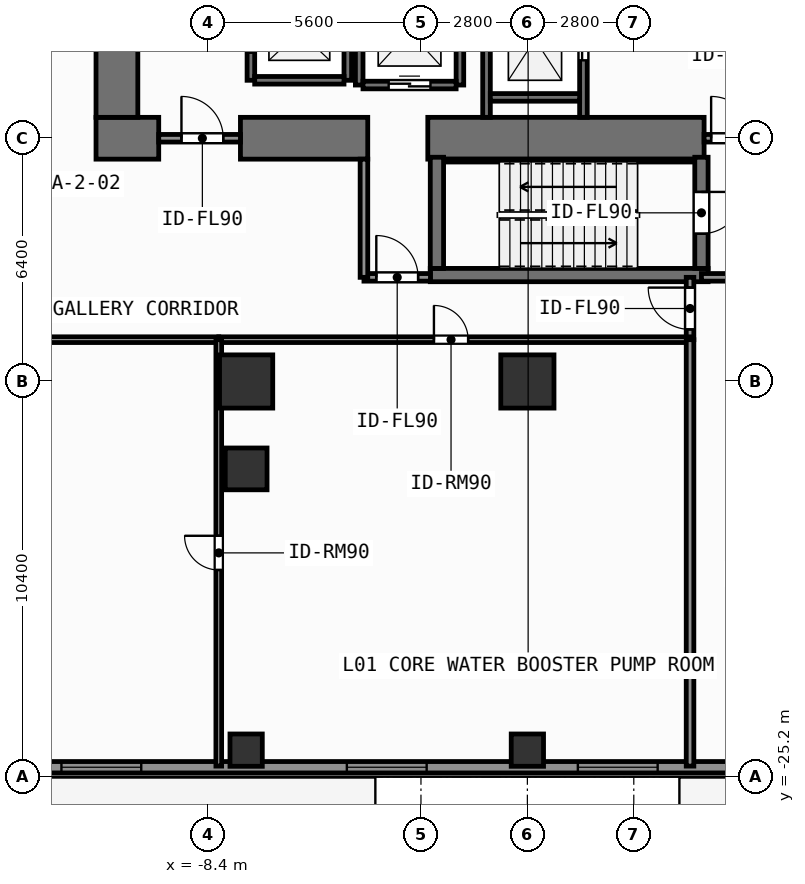
"""IFC4 building model, lengths in metres.
Left out: names, types, materials, properties, quantities, classifications, styles, units other than length and angle.
Written with IfcOpenShell. Run it as: python <this file> out.ifc"""

import sys

from ifc_helpers import new_model, si_unit, direction, frame, frame_2d, origin, origin_2d, place, context, subcontext, project, spatial, rectangle, extrude, element, fill, save


model = new_model("IFC4")
c1 = context("Model", 3, precision=1e-05, world=origin(), true_north=direction((0.0, 1.0)))
c2 = subcontext(c1, "Body", "Model", "MODEL_VIEW")
j1 = project(units=[si_unit("LENGTHUNIT", "METRE"), si_unit("PLANEANGLEUNIT", "RADIAN")], contexts=[c1])
p1 = place(None, origin())
s1 = spatial("IfcSite", under=j1, at=p1, CompositionType="ELEMENT")
p2 = place(p1, origin())
s2 = spatial("IfcBuilding", under=s1, at=p2, CompositionType="ELEMENT")
p3 = place(p2, origin())
s3 = spatial("IfcBuildingStorey", under=s2, at=p3, CompositionType="ELEMENT", Elevation=0.0)
p4 = place(p3, frame((-11.35, -8.4, 0.0), z_axis=(0.0, 0.0, 1.0), x_axis=(1.0, 0.0, 0.0)))
e1 = element("IfcWall", 1, at=p4, inside=s3, PredefinedType="SHEAR", context=c2, shape_type="SweptSolid", body=[
    extrude(rectangle(XDim=1.65, YDim=1.1, at=frame_2d((0.825, 0.0))), origin(), (0.0, 0.0, 1.0), 4.8),
])
p5 = place(p3, frame((-7.55, -8.4, 0.0), z_axis=(0.0, 0.0, 1.0), x_axis=(1.0, 0.0, 0.0)))
e2 = element("IfcWall", 2, at=p5, inside=s3, PredefinedType="SHEAR", context=c2, shape_type="SweptSolid", body=[
    extrude(rectangle(XDim=3.35, YDim=1.1, at=frame_2d((1.675, 0.0))), origin(), (0.0, 0.0, 1.0), 4.8),
])
p6 = place(p3, frame((-2.62, -8.4, 0.0), z_axis=(0.0, 0.0, 1.0), x_axis=(1.0, 0.0, 0.0)))
e3 = element("IfcWall", 3, at=p6, inside=s3, PredefinedType="SHEAR", context=c2, shape_type="SweptSolid", body=[
    extrude(rectangle(XDim=7.27, YDim=1.1, at=frame_2d((3.635, 0.0))), origin(), (0.0, 0.0, 1.0), 4.8),
])
p7 = place(p3, frame((-10.8, -7.85, 0.0), z_axis=(0.0, 0.0, 1.0), x_axis=(0.0, 1.0, 0.0)))
e4 = element("IfcWall", 4, at=p7, inside=s3, PredefinedType="SHEAR", context=c2, shape_type="SweptSolid", body=[
    extrude(rectangle(XDim=15.7, YDim=1.1, at=frame_2d((7.85, 0.0))), origin(), (0.0, 0.0, 1.0), 4.8),
])
p8 = place(p3, frame((-2.555, -12.0, 0.0), z_axis=(0.0, 0.0, 1.0), x_axis=(1.0, 0.0, 0.0)))
e5 = element("IfcWall", 5, at=p8, inside=s3, PredefinedType="SHEAR", context=c2, shape_type="SweptSolid", body=[
    extrude(rectangle(XDim=7.31, YDim=0.35, at=frame_2d((3.655, 0.0))), origin(), (0.0, 0.0, 1.0), 4.8),
])
p9 = place(p3, frame((-2.2, -8.988, 0.0), z_axis=(0.0, 0.0, 1.0), x_axis=(1.0, 0.0, 0.0)))
e6 = element("IfcWall", 6, at=p9, inside=s3, PredefinedType="SHEAR", context=c2, shape_type="SweptSolid", body=[
    extrude(rectangle(XDim=6.6, YDim=0.075, at=frame_2d((3.3, 0.0))), origin(), (0.0, 0.0, 1.0), 4.8),
])
p10 = place(p3, frame((-2.38, -11.825, 0.0), z_axis=(0.0, 0.0, 1.0), x_axis=(0.0, 1.0, 0.0)))
e7 = element("IfcWall", 7, at=p10, inside=s3, PredefinedType="SHEAR", context=c2, shape_type="SweptSolid", body=[
    extrude(rectangle(XDim=2.925, YDim=0.35, at=frame_2d((1.462, 0.0))), origin(), (0.0, 0.0, 1.0), 4.8),
])
p11 = place(p3, frame((4.58, -8.9, 0.0), z_axis=(0.0, 0.0, 1.0), x_axis=(0.0, -1.0, 0.0)))
e8 = element("IfcWall", 8, at=p11, inside=s3, PredefinedType="SHEAR", context=c2, shape_type="SweptSolid", body=[
    extrude(rectangle(XDim=2.925, YDim=0.35, at=frame_2d((1.462, 0.0))), origin(), (0.0, 0.0, 1.0), 4.8),
])
p12 = place(p11, frame((0.913, 0.0, 0.0)))
e9 = element("IfcOpeningElement", 9, at=p12, cuts=e8, PredefinedType="OPENING", context=c2, shape_type="SweptSolid", body=[
    extrude(rectangle(XDim=1.1, YDim=2.15, at=frame_2d((0.55, 1.075))), frame((0.0, 0.185, 0.0), z_axis=(0.0, -1.0, 0.0), x_axis=(1.0, 0.0, 0.0)), (0.0, 0.0, 1.0), 0.37),
])
for number, where, z_axis, x_axis in (
    (10, (-7.4, -14.8, 0.0), (0.0, 0.0, 1.0), (1.0, 0.0, 0.0)),
    (11, (0.0, -14.8, 0.0), (0.0, 0.0, 1.0), (1.0, 0.0, 0.0)),
):
    element("IfcColumn", number, at=place(p3, frame(where, z_axis=z_axis, x_axis=x_axis)), inside=s3, PredefinedType="COLUMN", context=c2, shape_type="SweptSolid", body=[
        extrude(rectangle(XDim=1.4, YDim=1.4, at=origin_2d()), origin(), (0.0, 0.0, 1.0), 4.8),
    ])
p13 = place(p3, frame((-7.4, -17.1, 0.0), z_axis=(0.0, 0.0, 1.0), x_axis=(1.0, 0.0, 0.0)))
e12 = element("IfcColumn", 12, at=p13, inside=s3, PredefinedType="COLUMN", context=c2, shape_type="SweptSolid", body=[
    extrude(rectangle(XDim=1.1, YDim=1.1, at=origin_2d()), origin(), (0.0, 0.0, 1.0), 4.8),
])
for number, where, z_axis, x_axis in (
    (13, (-7.4, -24.5, 0.0), (0.0, 0.0, 1.0), (1.0, 0.0, 0.0)),
    (14, (0.0, -24.5, 0.0), (0.0, 0.0, 1.0), (1.0, 0.0, 0.0)),
):
    element("IfcColumn", number, at=place(p3, frame(where, z_axis=z_axis, x_axis=x_axis)), inside=s3, PredefinedType="COLUMN", context=c2, shape_type="SweptSolid", body=[
        extrude(rectangle(XDim=0.85, YDim=0.85, at=origin_2d()), origin(), (0.0, 0.0, 1.0), 4.8),
    ])
p14 = place(p3, frame((29.1, -24.95, 0.0), z_axis=(0.0, 0.0, 1.0), x_axis=(-1.0, 0.0, 0.0)))
e15 = element("IfcWall", 15, at=p14, inside=s3, PredefinedType="SOLIDWALL", context=c2, shape_type="SweptSolid", body=[
    extrude(rectangle(XDim=58.2, YDim=0.3, at=frame_2d((29.1, 0.0))), origin(), (0.0, 0.0, 1.0), 4.56),
])
p15 = place(p14, frame((39.26, 0.0, 0.85)))
e16 = element("IfcOpeningElement", 16, at=p15, cuts=e15, PredefinedType="OPENING", context=c2, shape_type="SweptSolid", body=[
    extrude(rectangle(XDim=2.1, YDim=2.2, at=frame_2d((1.05, 1.1))), frame((0.0, 0.16, 0.0), z_axis=(0.0, -1.0, 0.0), x_axis=(1.0, 0.0, 0.0)), (0.0, 0.0, 1.0), 0.32),
])
p16 = place(p14, frame((31.75, 0.0, 0.85)))
e17 = element("IfcOpeningElement", 17, at=p16, cuts=e15, PredefinedType="OPENING", context=c2, shape_type="SweptSolid", body=[
    extrude(rectangle(XDim=2.1, YDim=2.2, at=frame_2d((1.05, 1.1))), frame((0.0, 0.16, 0.0), z_axis=(0.0, -1.0, 0.0), x_axis=(1.0, 0.0, 0.0)), (0.0, 0.0, 1.0), 0.32),
])
p17 = place(p14, frame((25.672, 0.0, 0.85)))
e18 = element("IfcOpeningElement", 18, at=p17, cuts=e15, PredefinedType="OPENING", context=c2, shape_type="SweptSolid", body=[
    extrude(rectangle(XDim=2.1, YDim=2.2, at=frame_2d((1.05, 1.1))), frame((0.0, 0.16, 0.0), z_axis=(0.0, -1.0, 0.0), x_axis=(1.0, 0.0, 0.0)), (0.0, 0.0, 1.0), 0.32),
])
p18 = place(p14, frame((17.65, 0.0, 0.0)))
e19 = element("IfcOpeningElement", 19, at=p18, cuts=e15, PredefinedType="OPENING", context=c2, shape_type="SweptSolid", body=[
    extrude(rectangle(XDim=1.3, YDim=2.2, at=frame_2d((0.65, 1.1))), frame((0.0, 0.16, 0.0), z_axis=(0.0, -1.0, 0.0), x_axis=(1.0, 0.0, 0.0)), (0.0, 0.0, 1.0), 0.32),
])
p19 = place(p14, frame((6.75, 0.0, 0.0)))
e20 = element("IfcOpeningElement", 20, at=p19, cuts=e15, PredefinedType="OPENING", context=c2, shape_type="SweptSolid", body=[
    extrude(rectangle(XDim=1.3, YDim=2.2, at=frame_2d((0.65, 1.1))), frame((0.0, 0.16, 0.0), z_axis=(0.0, -1.0, 0.0), x_axis=(1.0, 0.0, 0.0)), (0.0, 0.0, 1.0), 0.32),
])
p20 = place(p14, frame((45.95, 0.0, 0.0)))
e21 = element("IfcOpeningElement", 21, at=p20, cuts=e15, PredefinedType="OPENING", context=c2, shape_type="SweptSolid", body=[
    extrude(rectangle(XDim=1.3, YDim=2.2, at=frame_2d((0.65, 1.1))), frame((0.0, 0.16, 0.0), z_axis=(0.0, -1.0, 0.0), x_axis=(1.0, 0.0, 0.0)), (0.0, 0.0, 1.0), 0.32),
])
p21 = place(p3, frame((-7.275, -6.875, 0.0), z_axis=(0.0, 0.0, 1.0), x_axis=(0.0, 1.0, 0.0)))
e22 = element("IfcWall", 22, at=p21, inside=s3, PredefinedType="SHEAR", context=c2, shape_type="SweptSolid", body=[
    extrude(rectangle(XDim=2.55, YDim=0.2, at=frame_2d((1.275, 0.0))), origin(), (0.0, 0.0, 1.0), 4.56),
])
p22 = place(p21, frame((0.725, 0.0, 0.0)))
e23 = element("IfcOpeningElement", 23, at=p22, cuts=e22, PredefinedType="OPENING", context=c2, shape_type="SweptSolid", body=[
    extrude(rectangle(XDim=1.1, YDim=2.2, at=frame_2d((0.55, 1.1))), frame((0.0, 0.11, 0.0), z_axis=(0.0, -1.0, 0.0), x_axis=(1.0, 0.0, 0.0)), (0.0, 0.0, 1.0), 0.22),
])
p23 = place(p3, frame((-4.725, -6.875, 0.0), z_axis=(0.0, 0.0, 1.0), x_axis=(0.0, 1.0, 0.0)))
e24 = element("IfcWall", 24, at=p23, inside=s3, PredefinedType="SHEAR", context=c2, shape_type="SweptSolid", body=[
    extrude(rectangle(XDim=2.55, YDim=0.2, at=frame_2d((1.275, 0.0))), origin(), (0.0, 0.0, 1.0), 4.56),
])
p24 = place(p3, frame((-7.175, -6.875, 0.0), z_axis=(0.0, 0.0, 1.0), x_axis=(1.0, 0.0, 0.0)))
e25 = element("IfcWall", 25, at=p24, inside=s3, PredefinedType="SHEAR", context=c2, shape_type="SweptSolid", body=[
    extrude(rectangle(XDim=2.35, YDim=0.2, at=frame_2d((1.175, 0.0))), origin(), (0.0, 0.0, 1.0), 4.56),
])
for number, where, z_axis, x_axis in (
    (26, (-4.425, -7.0, 0.0), (0.0, 0.0, 1.0), (0.0, 1.0, 0.0)),
    (27, (-1.775, -7.0, 0.0), (0.0, 0.0, 1.0), (0.0, 1.0, 0.0)),
):
    element("IfcWall", number, at=place(p3, frame(where, z_axis=z_axis, x_axis=x_axis)), inside=s3, PredefinedType="SHEAR", context=c2, shape_type="SweptSolid", body=[
        extrude(rectangle(XDim=2.8, YDim=0.2, at=frame_2d((1.4, 0.0))), origin(), (0.0, 0.0, 1.0), 4.56),
    ])
p25 = place(p3, frame((-4.325, -7.0, 0.0), z_axis=(0.0, 0.0, 1.0), x_axis=(1.0, 0.0, 0.0)))
e28 = element("IfcWall", 28, at=p25, inside=s3, PredefinedType="SHEAR", context=c2, shape_type="SweptSolid", body=[
    extrude(rectangle(XDim=2.45, YDim=0.2, at=frame_2d((1.225, 0.0))), origin(), (0.0, 0.0, 1.0), 4.56),
])
p26 = place(p25, frame((0.675, 0.0, 0.0)))
e29 = element("IfcOpeningElement", 29, at=p26, cuts=e28, PredefinedType="OPENING", context=c2, shape_type="SweptSolid", body=[
    extrude(rectangle(XDim=1.1, YDim=2.2, at=frame_2d((0.55, 1.1))), frame((0.0, 0.11, 0.0), z_axis=(0.0, -1.0, 0.0), x_axis=(1.0, 0.0, 0.0)), (0.0, 0.0, 1.0), 0.22),
])
p27 = place(p3, frame((-1.075, -7.85, 0.0), z_axis=(0.0, 0.0, 1.0), x_axis=(0.0, 1.0, 0.0)))
e30 = element("IfcWall", 30, at=p27, inside=s3, PredefinedType="SHEAR", context=c2, shape_type="SweptSolid", body=[
    extrude(rectangle(XDim=3.575, YDim=0.2, at=frame_2d((1.788, 0.0))), origin(), (0.0, 0.0, 1.0), 4.56),
])
p28 = place(p3, frame((1.475, -7.85, 0.0), z_axis=(0.0, 0.0, 1.0), x_axis=(0.0, 1.0, 0.0)))
e31 = element("IfcWall", 31, at=p28, inside=s3, PredefinedType="SHEAR", context=c2, shape_type="SweptSolid", body=[
    extrude(rectangle(XDim=3.575, YDim=0.2, at=frame_2d((1.788, 0.0))), origin(), (0.0, 0.0, 1.0), 4.56),
])
p29 = place(p28, frame((1.5, 0.0, 0.0)))
e32 = element("IfcOpeningElement", 32, at=p29, cuts=e31, PredefinedType="OPENING", context=c2, shape_type="SweptSolid", body=[
    extrude(rectangle(XDim=1.1, YDim=2.2, at=frame_2d((0.55, 1.1))), frame((0.0, 0.11, 0.0), z_axis=(0.0, -1.0, 0.0), x_axis=(1.0, 0.0, 0.0)), (0.0, 0.0, 1.0), 0.22),
])
p30 = place(p3, frame((-0.975, -7.325, 0.0), z_axis=(0.0, 0.0, 1.0), x_axis=(1.0, 0.0, 0.0)))
e33 = element("IfcWall", 33, at=p30, inside=s3, PredefinedType="SHEAR", context=c2, shape_type="SweptSolid", body=[
    extrude(rectangle(XDim=2.35, YDim=0.2, at=frame_2d((1.175, 0.0))), origin(), (0.0, 0.0, 1.0), 4.56),
])
p31 = place(p3, frame((4.58, -12.06, 0.0), z_axis=(0.0, 0.0, 1.0), x_axis=(1.0, 0.0, 0.0)))
e34 = element("IfcWall", 34, at=p31, inside=s3, PredefinedType="SOLIDWALL", context=c2, shape_type="SweptSolid", body=[
    extrude(rectangle(XDim=3.7, YDim=0.2, at=frame_2d((1.85, 0.0))), origin(), (0.0, 0.0, 1.0), 4.56),
])
p32 = place(p31, frame((1.212, 0.0, 0.0)))
e35 = element("IfcOpeningElement", 35, at=p32, cuts=e34, PredefinedType="OPENING", context=c2, shape_type="SweptSolid", body=[
    extrude(rectangle(XDim=1.1, YDim=2.15, at=frame_2d((0.55, 1.075))), frame((0.0, 0.11, 0.0), z_axis=(0.0, -1.0, 0.0), x_axis=(1.0, 0.0, 0.0)), (0.0, 0.0, 1.0), 0.22),
])
p33 = place(p3, frame((4.65, -8.4, 0.0), z_axis=(0.0, 0.0, 1.0), x_axis=(1.0, 0.0, 0.0)))
e36 = element("IfcWall", 36, at=p33, inside=s3, PredefinedType="SOLIDWALL", context=c2, shape_type="SweptSolid", body=[
    extrude(rectangle(XDim=1.47, YDim=0.2, at=frame_2d((0.735, 0.0))), origin(), (0.0, 0.0, 1.0), 3.6),
])
p34 = place(p33, frame((0.185, 0.0, 0.0)))
e37 = element("IfcOpeningElement", 37, at=p34, cuts=e36, PredefinedType="OPENING", context=c2, shape_type="SweptSolid", body=[
    extrude(rectangle(XDim=1.1, YDim=2.15, at=frame_2d((0.55, 1.075))), frame((0.0, 0.11, 0.0), z_axis=(0.0, -1.0, 0.0), x_axis=(1.0, 0.0, 0.0)), (0.0, 0.0, 1.0), 0.22),
])
p35 = place(p3, frame((-9.7, -8.4, 0.0), z_axis=(0.0, 0.0, 1.0), x_axis=(1.0, 0.0, 0.0)))
e38 = element("IfcWall", 38, at=p35, inside=s3, PredefinedType="SOLIDWALL", context=c2, shape_type="SweptSolid", body=[
    extrude(rectangle(XDim=2.15, YDim=0.2, at=frame_2d((1.075, 0.0))), origin(), (0.0, 0.0, 1.0), 3.6),
])
p36 = place(p35, frame((0.598, 0.0, 0.0)))
e39 = element("IfcOpeningElement", 39, at=p36, cuts=e38, PredefinedType="OPENING", context=c2, shape_type="SweptSolid", body=[
    extrude(rectangle(XDim=1.1, YDim=2.15, at=frame_2d((0.55, 1.075))), frame((0.0, 0.11, 0.0), z_axis=(0.0, -1.0, 0.0), x_axis=(1.0, 0.0, 0.0)), (0.0, 0.0, 1.0), 0.22),
])
p37 = place(p3, frame((-4.3, -12.06, 0.0), z_axis=(0.0, 0.0, 1.0), x_axis=(1.0, 0.0, 0.0)))
e40 = element("IfcWall", 40, at=p37, inside=s3, PredefinedType="SOLIDWALL", context=c2, shape_type="SweptSolid", body=[
    extrude(rectangle(XDim=1.75, YDim=0.2, at=frame_2d((0.875, 0.0))), origin(), (0.0, 0.0, 1.0), 4.56),
])
p38 = place(p37, frame((0.325, 0.0, 0.0)))
e41 = element("IfcOpeningElement", 41, at=p38, cuts=e40, PredefinedType="OPENING", context=c2, shape_type="SweptSolid", body=[
    extrude(rectangle(XDim=1.1, YDim=2.15, at=frame_2d((0.55, 1.075))), frame((0.0, 0.11, 0.0), z_axis=(0.0, -1.0, 0.0), x_axis=(1.0, 0.0, 0.0)), (0.0, 0.0, 1.0), 0.22),
])
p39 = place(p3, frame((4.28, -13.7, 0.0), z_axis=(0.0, 0.0, 1.0), x_axis=(0.0, 1.0, 0.0)))
e42 = element("IfcWall", 42, at=p39, inside=s3, PredefinedType="SOLIDWALL", context=c2, shape_type="SweptSolid", body=[
    extrude(rectangle(XDim=1.64, YDim=0.2, at=frame_2d((0.82, 0.0))), origin(), (0.0, 0.0, 1.0), 4.56),
])
p40 = place(p39, frame((0.27, 0.0, 0.0)))
e43 = element("IfcOpeningElement", 43, at=p40, cuts=e42, PredefinedType="OPENING", context=c2, shape_type="SweptSolid", body=[
    extrude(rectangle(XDim=1.1, YDim=2.15, at=frame_2d((0.55, 1.075))), frame((0.0, 0.11, 0.0), z_axis=(0.0, -1.0, 0.0), x_axis=(1.0, 0.0, 0.0)), (0.0, 0.0, 1.0), 0.22),
])
p41 = place(p3, frame((-33.42, -13.7, 0.0), z_axis=(0.0, 0.0, 1.0), x_axis=(1.0, 0.0, 0.0)))
e44 = element("IfcWall", 44, at=p41, inside=s3, PredefinedType="PARTITIONING", context=c2, shape_type="SweptSolid", body=[
    extrude(rectangle(XDim=25.3, YDim=0.15, at=frame_2d((12.65, 0.0))), origin(), (0.0, 0.0, 1.0), 4.56),
])
p42 = place(p41, frame((10.591, 0.0, 0.0)))
e45 = element("IfcOpeningElement", 45, at=p42, cuts=e44, PredefinedType="OPENING", context=c2, shape_type="SweptSolid", body=[
    extrude(rectangle(XDim=1.6, YDim=2.3, at=frame_2d((0.8, 1.15))), frame((0.0, 0.085, 0.0), z_axis=(0.0, -1.0, 0.0), x_axis=(1.0, 0.0, 0.0)), (0.0, 0.0, 1.0), 0.17),
])
p43 = place(p3, frame((-8.12, -13.7, 0.0), z_axis=(0.0, 0.0, 1.0), x_axis=(1.0, 0.0, 0.0)))
e46 = element("IfcWall", 46, at=p43, inside=s3, PredefinedType="PARTITIONING", context=c2, shape_type="SweptSolid", body=[
    extrude(rectangle(XDim=12.4, YDim=0.15, at=frame_2d((6.2, 0.0))), origin(), (0.0, 0.0, 1.0), 4.56),
])
p44 = place(p43, frame((5.661, 0.0, 0.0)))
e47 = element("IfcOpeningElement", 47, at=p44, cuts=e46, PredefinedType="OPENING", context=c2, shape_type="SweptSolid", body=[
    extrude(rectangle(XDim=0.9, YDim=2.1, at=frame_2d((0.45, 1.05))), frame((0.0, 0.085, 0.0), z_axis=(0.0, -1.0, 0.0), x_axis=(1.0, 0.0, 0.0)), (0.0, 0.0, 1.0), 0.17),
])
p45 = place(p3, frame((-8.12, -24.92, 0.0), z_axis=(0.0, 0.0, 1.0), x_axis=(0.0, 1.0, 0.0)))
e48 = element("IfcWall", 48, at=p45, inside=s3, PredefinedType="PARTITIONING", context=c2, shape_type="SweptSolid", body=[
    extrude(rectangle(XDim=11.22, YDim=0.15, at=frame_2d((5.61, 0.0))), origin(), (0.0, 0.0, 1.0), 4.56),
])
p46 = place(p45, frame((5.16, 0.0, 0.0)))
e49 = element("IfcOpeningElement", 49, at=p46, cuts=e48, PredefinedType="OPENING", context=c2, shape_type="SweptSolid", body=[
    extrude(rectangle(XDim=0.9, YDim=2.1, at=frame_2d((0.45, 1.05))), frame((0.0, 0.085, 0.0), z_axis=(0.0, -1.0, 0.0), x_axis=(1.0, 0.0, 0.0)), (0.0, 0.0, 1.0), 0.17),
])
p47 = place(p3, frame((-4.3, -12.06, 0.0), z_axis=(0.0, 0.0, 1.0), x_axis=(0.0, 1.0, 0.0)))
e50 = element("IfcWall", 50, at=p47, inside=s3, PredefinedType="SOLIDWALL", context=c2, shape_type="SweptSolid", body=[
    extrude(rectangle(XDim=3.11, YDim=0.2, at=frame_2d((1.555, 0.0))), origin(), (0.0, 0.0, 1.0), 4.56),
])
p48 = place(p3, frame((4.28, -24.92, 0.0), z_axis=(0.0, 0.0, 1.0), x_axis=(0.0, 1.0, 0.0)))
e51 = element("IfcWall", 51, at=p48, inside=s3, PredefinedType="SOLIDWALL", context=c2, shape_type="SweptSolid", body=[
    extrude(rectangle(XDim=11.22, YDim=0.2, at=frame_2d((5.61, 0.0))), origin(), (0.0, 0.0, 1.0), 4.56),
])
p49 = place(p15, origin())
e52 = element("IfcWindow", 52, at=p49, inside=s3, PartitioningType="SINGLE_PANEL", PredefinedType="WINDOW", context=c2, shape_type="SweptSolid", body=[
    extrude(rectangle(XDim=2.1, YDim=2.2, at=frame_2d((1.05, 1.1))), frame((0.0, 0.03, 0.0), z_axis=(0.0, -1.0, 0.0), x_axis=(1.0, 0.0, 0.0)), (0.0, 0.0, 1.0), 0.06),
])
fill(e16, e52)
p50 = place(p16, origin())
e53 = element("IfcWindow", 53, at=p50, inside=s3, PartitioningType="SINGLE_PANEL", PredefinedType="WINDOW", context=c2, shape_type="SweptSolid", body=[
    extrude(rectangle(XDim=2.1, YDim=2.2, at=frame_2d((1.05, 1.1))), frame((0.0, 0.03, 0.0), z_axis=(0.0, -1.0, 0.0), x_axis=(1.0, 0.0, 0.0)), (0.0, 0.0, 1.0), 0.06),
])
fill(e17, e53)
p51 = place(p17, origin())
e54 = element("IfcWindow", 54, at=p51, inside=s3, PartitioningType="SINGLE_PANEL", PredefinedType="WINDOW", context=c2, shape_type="SweptSolid", body=[
    extrude(rectangle(XDim=2.1, YDim=2.2, at=frame_2d((1.05, 1.1))), frame((0.0, 0.03, 0.0), z_axis=(0.0, -1.0, 0.0), x_axis=(1.0, 0.0, 0.0)), (0.0, 0.0, 1.0), 0.06),
])
fill(e18, e54)
p52 = place(p22, origin())
e55 = element("IfcDoor", 55, at=p52, inside=s3, OperationType="SLIDING_TO_LEFT", PredefinedType="DOOR", context=c2, shape_type="SweptSolid", body=[
    extrude(rectangle(XDim=1.1, YDim=2.2, at=frame_2d((0.55, 1.1))), frame((0.0, 0.025, 0.0), z_axis=(0.0, -1.0, 0.0), x_axis=(1.0, 0.0, 0.0)), (0.0, 0.0, 1.0), 0.05),
])
fill(e23, e55)
p53 = place(p26, origin())
e56 = element("IfcDoor", 56, at=p53, inside=s3, OperationType="SLIDING_TO_LEFT", PredefinedType="DOOR", context=c2, shape_type="SweptSolid", body=[
    extrude(rectangle(XDim=1.1, YDim=2.2, at=frame_2d((0.55, 1.1))), frame((0.0, 0.025, 0.0), z_axis=(0.0, -1.0, 0.0), x_axis=(1.0, 0.0, 0.0)), (0.0, 0.0, 1.0), 0.05),
])
fill(e29, e56)
p54 = place(p29, origin())
e57 = element("IfcDoor", 57, at=p54, inside=s3, OperationType="SLIDING_TO_LEFT", PredefinedType="DOOR", context=c2, shape_type="SweptSolid", body=[
    extrude(rectangle(XDim=1.1, YDim=2.2, at=frame_2d((0.55, 1.1))), frame((0.0, 0.025, 0.0), z_axis=(0.0, -1.0, 0.0), x_axis=(1.0, 0.0, 0.0)), (0.0, 0.0, 1.0), 0.05),
])
fill(e32, e57)
p55 = place(p12, origin())
e58 = element("IfcDoor", 58, at=p55, inside=s3, OperationType="SINGLE_SWING_LEFT", PredefinedType="DOOR", context=c2, shape_type="SweptSolid", body=[
    extrude(rectangle(XDim=1.1, YDim=2.15, at=frame_2d((0.55, 1.075))), frame((0.0, 0.025, 0.0), z_axis=(0.0, -1.0, 0.0), x_axis=(1.0, 0.0, 0.0)), (0.0, 0.0, 1.0), 0.05),
])
fill(e9, e58)
p56 = place(p34, origin())
e59 = element("IfcDoor", 59, at=p56, inside=s3, OperationType="SINGLE_SWING_LEFT", PredefinedType="DOOR", context=c2, shape_type="SweptSolid", body=[
    extrude(rectangle(XDim=1.1, YDim=2.15, at=frame_2d((0.55, 1.075))), frame((0.0, 0.025, 0.0), z_axis=(0.0, -1.0, 0.0), x_axis=(1.0, 0.0, 0.0)), (0.0, 0.0, 1.0), 0.05),
])
fill(e37, e59)
p57 = place(p36, origin())
e60 = element("IfcDoor", 60, at=p57, inside=s3, OperationType="SINGLE_SWING_LEFT", PredefinedType="DOOR", context=c2, shape_type="SweptSolid", body=[
    extrude(rectangle(XDim=1.1, YDim=2.15, at=frame_2d((0.55, 1.075))), frame((0.0, 0.025, 0.0), z_axis=(0.0, -1.0, 0.0), x_axis=(1.0, 0.0, 0.0)), (0.0, 0.0, 1.0), 0.05),
])
fill(e39, e60)
p58 = place(p38, origin())
e61 = element("IfcDoor", 61, at=p58, inside=s3, OperationType="SINGLE_SWING_LEFT", PredefinedType="DOOR", context=c2, shape_type="SweptSolid", body=[
    extrude(rectangle(XDim=1.1, YDim=2.15, at=frame_2d((0.55, 1.075))), frame((0.0, 0.025, 0.0), z_axis=(0.0, -1.0, 0.0), x_axis=(1.0, 0.0, 0.0)), (0.0, 0.0, 1.0), 0.05),
])
fill(e41, e61)
p59 = place(p40, origin())
e62 = element("IfcDoor", 62, at=p59, inside=s3, OperationType="SINGLE_SWING_RIGHT", PredefinedType="DOOR", context=c2, shape_type="SweptSolid", body=[
    extrude(rectangle(XDim=1.1, YDim=2.15, at=frame_2d((0.55, 1.075))), frame((0.0, 0.025, 0.0), z_axis=(0.0, -1.0, 0.0), x_axis=(1.0, 0.0, 0.0)), (0.0, 0.0, 1.0), 0.05),
])
fill(e43, e62)
p60 = place(p44, origin())
e63 = element("IfcDoor", 63, at=p60, inside=s3, OperationType="SINGLE_SWING_LEFT", PredefinedType="DOOR", context=c2, shape_type="SweptSolid", body=[
    extrude(rectangle(XDim=0.9, YDim=2.1, at=frame_2d((0.45, 1.05))), frame((0.0, 0.025, 0.0), z_axis=(0.0, -1.0, 0.0), x_axis=(1.0, 0.0, 0.0)), (0.0, 0.0, 1.0), 0.05),
])
fill(e47, e63)
p61 = place(p46, origin())
e64 = element("IfcDoor", 64, at=p61, inside=s3, OperationType="SINGLE_SWING_RIGHT", PredefinedType="DOOR", context=c2, shape_type="SweptSolid", body=[
    extrude(rectangle(XDim=0.9, YDim=2.1, at=frame_2d((0.45, 1.05))), frame((0.0, 0.025, 0.0), z_axis=(0.0, -1.0, 0.0), x_axis=(1.0, 0.0, 0.0)), (0.0, 0.0, 1.0), 0.05),
])
fill(e49, e64)
save(model, sys.argv[1])
